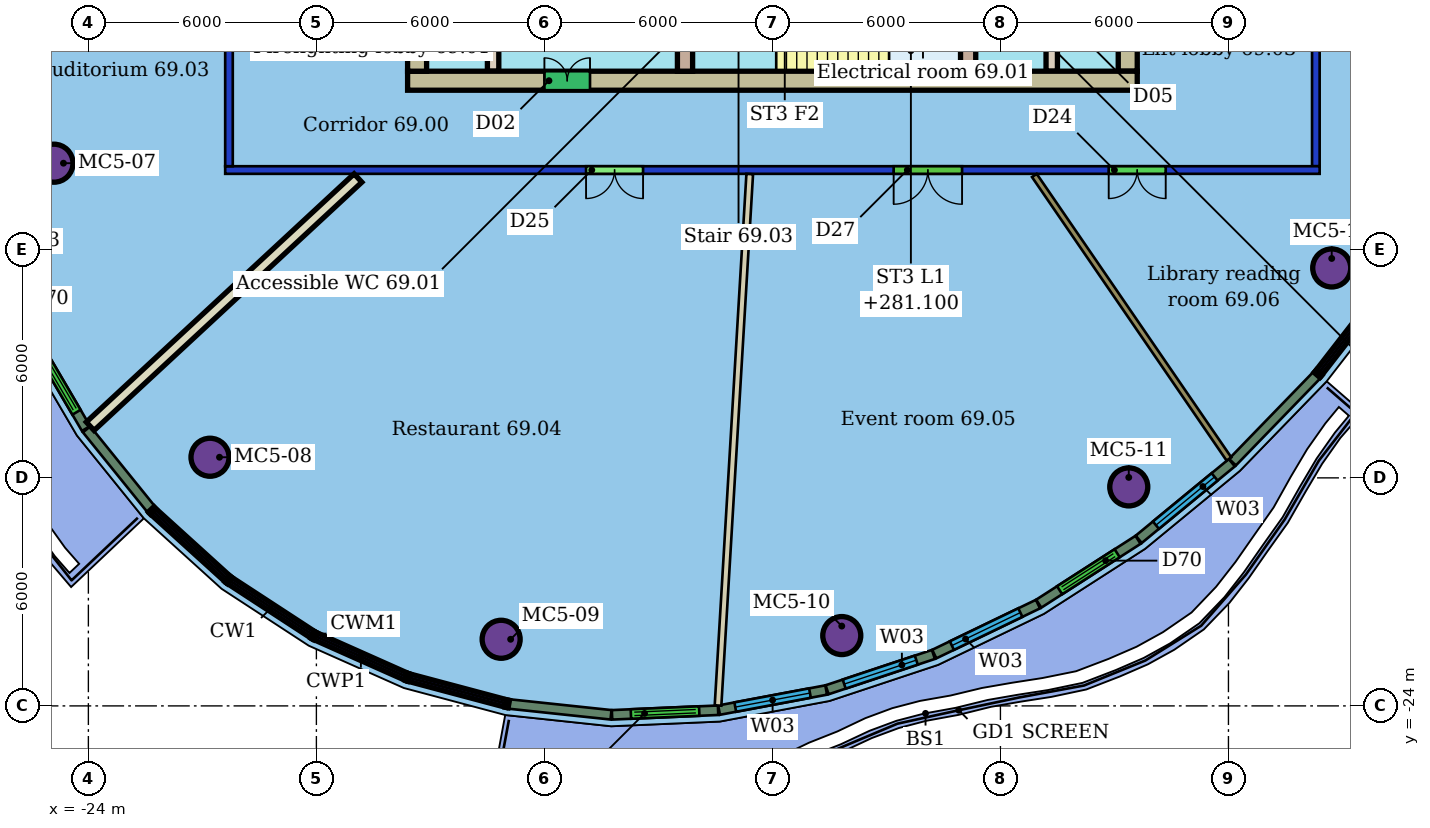
"""IFC4 building model, lengths in metres.
Left out: names, types, materials, properties, quantities, classifications, styles, units other than length and angle.
Written with IfcOpenShell. Run it as: python <this file> out.ifc"""

import sys

from ifc_helpers import new_model, si_unit, direction, frame, frame_2d, origin, origin_2d, place, context, subcontext, project, spatial, rectangle, hollow_circle, extrude, element, fill, save


model = new_model("IFC4")
c1 = context("Model", 3, precision=1e-05, world=origin(), true_north=direction((0.0, 1.0)))
c2 = subcontext(c1, "Body", "Model", "MODEL_VIEW")
j1 = project(units=[si_unit("LENGTHUNIT", "METRE"), si_unit("PLANEANGLEUNIT", "RADIAN")], contexts=[c1])
p1 = place(None, origin())
s1 = spatial("IfcSite", under=j1, at=p1, CompositionType="ELEMENT")
p2 = place(p1, origin())
s2 = spatial("IfcBuilding", under=s1, at=p2, CompositionType="ELEMENT")
p3 = place(p2, frame((0.0, 0.0, 279.3)))
s3 = spatial("IfcBuildingStorey", under=s2, at=p3, CompositionType="ELEMENT", Elevation=279.3)
for number, where, z_axis, x_axis in (
    (1, (-24.906, -9.72, 0.0), (0.0, 0.0, 1.0), (1.0, 0.0, 0.0)),
    (2, (-20.8, -17.457, 0.0), (0.0, 0.0, 1.0), (1.0, 0.0, 0.0)),
    (3, (-13.138, -22.247, 0.0), (0.0, 0.0, 1.0), (1.0, 0.0, 0.0)),
    (4, (-4.175, -22.149, 0.0), (0.0, 0.0, 1.0), (1.0, 0.0, 0.0)),
    (5, (3.377, -18.238, 0.0), (0.0, 0.0, 1.0), (1.0, 0.0, 0.0)),
    (6, (8.718, -12.477, 0.0), (0.0, 0.0, 1.0), (1.0, 0.0, 0.0)),
):
    element("IfcColumn", number, at=place(p3, frame(where, z_axis=z_axis, x_axis=x_axis)), inside=s3, PredefinedType="COLUMN", context=c2, shape_type="SweptSolid", body=[
        extrude(hollow_circle(Radius=0.5, WallThickness=0.04, at=origin_2d()), origin(), (0.0, 0.0, 1.0), 3.45),
    ])
p4 = place(p3, frame((8.4, -9.9, 0.0), z_axis=(0.0, 0.0, 1.0), x_axis=(-1.0, 0.0, 0.0)))
e7 = element("IfcWall", 7, at=p4, inside=s3, PredefinedType="PARTITIONING", context=c2, shape_type="SweptSolid", body=[
    extrude(rectangle(XDim=28.8, YDim=0.2, at=frame_2d((14.4, 0.0))), origin(), (0.0, 0.0, 1.0), 3.1),
])
p5 = place(p4, frame((17.804, 0.0, 0.0)))
e8 = element("IfcOpeningElement", 8, at=p5, cuts=e7, PredefinedType="OPENING", context=c2, shape_type="SweptSolid", body=[
    extrude(rectangle(XDim=1.5, YDim=2.4, at=frame_2d((0.75, 1.2))), frame((0.0, 0.11, 0.0), z_axis=(0.0, -1.0, 0.0), x_axis=(1.0, 0.0, 0.0)), (0.0, 0.0, 1.0), 0.22),
])
p6 = place(p4, frame((9.41, 0.0, 0.0)))
e9 = element("IfcOpeningElement", 9, at=p6, cuts=e7, PredefinedType="OPENING", context=c2, shape_type="SweptSolid", body=[
    extrude(rectangle(XDim=1.8, YDim=2.4, at=frame_2d((0.9, 1.2))), frame((0.0, 0.11, 0.0), z_axis=(0.0, -1.0, 0.0), x_axis=(1.0, 0.0, 0.0)), (0.0, 0.0, 1.0), 0.22),
])
p7 = place(p4, frame((4.051, 0.0, 0.0)))
e10 = element("IfcOpeningElement", 10, at=p7, cuts=e7, PredefinedType="OPENING", context=c2, shape_type="SweptSolid", body=[
    extrude(rectangle(XDim=1.5, YDim=2.1, at=frame_2d((0.75, 1.05))), frame((0.0, 0.11, 0.0), z_axis=(0.0, -1.0, 0.0), x_axis=(1.0, 0.0, 0.0)), (0.0, 0.0, 1.0), 0.22),
])
p8 = place(p3, frame((-20.3, -9.8, 0.0), z_axis=(0.0, 0.0, 1.0), x_axis=(0.0, 1.0, 0.0)))
e11 = element("IfcWall", 11, at=p8, inside=s3, PredefinedType="PARTITIONING", context=c2, shape_type="SweptSolid", body=[
    extrude(rectangle(XDim=19.6, YDim=0.2, at=frame_2d((9.8, 0.0))), origin(), (0.0, 0.0, 1.0), 3.1),
])
p9 = place(p8, frame((5.619, 0.0, 0.0)))
e12 = element("IfcOpeningElement", 12, at=p9, cuts=e11, PredefinedType="OPENING", context=c2, shape_type="SweptSolid", body=[
    extrude(rectangle(XDim=1.8, YDim=2.4, at=frame_2d((0.9, 1.2))), frame((0.0, 0.11, 0.0), z_axis=(0.0, -1.0, 0.0), x_axis=(1.0, 0.0, 0.0)), (0.0, 0.0, 1.0), 0.22),
])
p10 = place(p3, frame((8.3, 9.8, 0.0), z_axis=(0.0, 0.0, 1.0), x_axis=(0.0, -1.0, 0.0)))
e13 = element("IfcWall", 13, at=p10, inside=s3, PredefinedType="PARTITIONING", context=c2, shape_type="SweptSolid", body=[
    extrude(rectangle(XDim=19.6, YDim=0.2, at=frame_2d((9.8, 0.0))), origin(), (0.0, 0.0, 1.0), 3.1),
])
p11 = place(p10, frame((7.656, 0.0, 0.0)))
e14 = element("IfcOpeningElement", 14, at=p11, cuts=e13, PredefinedType="OPENING", context=c2, shape_type="SweptSolid", body=[
    extrude(rectangle(XDim=1.5, YDim=2.4, at=frame_2d((0.75, 1.2))), frame((0.0, 0.11, 0.0), z_axis=(0.0, -1.0, 0.0), x_axis=(1.0, 0.0, 0.0)), (0.0, 0.0, 1.0), 0.22),
])
p12 = place(p3, frame((-23.952, -16.642, 0.0), z_axis=(0.0, 0.0, 1.0), x_axis=(0.733357987337, 0.679842674748, 0.0)))
e15 = element("IfcWall", 15, at=p12, inside=s3, PredefinedType="PARTITIONING", context=c2, shape_type="SweptSolid", body=[
    extrude(rectangle(XDim=9.608, YDim=0.3, at=frame_2d((4.804, 0.0))), origin(), (0.0, 0.0, 1.0), 3.45),
])
p13 = place(p3, frame((-7.431, -23.99, 0.0), z_axis=(0.0, 0.0, 1.0), x_axis=(0.059548467955, 0.998225415407, 0.0)))
e16 = element("IfcWall", 16, at=p13, inside=s3, PredefinedType="PARTITIONING", context=c2, shape_type="SweptSolid", body=[
    extrude(rectangle(XDim=14.009, YDim=0.175, at=frame_2d((7.005, 0.0))), origin(), (0.0, 0.0, 1.0), 3.45),
])
p14 = place(p3, frame((6.013, -17.503, 0.0), z_axis=(0.0, 0.0, 1.0), x_axis=(-0.565875944345, 0.824490397525, 0.0)))
e17 = element("IfcWall", 17, at=p14, inside=s3, PredefinedType="PARTITIONING", context=c2, shape_type="SweptSolid", body=[
    extrude(rectangle(XDim=9.049, YDim=0.15, at=frame_2d((4.524, 0.0))), origin(), (0.0, 0.0, 1.0), 3.45),
])
p15 = place(p3, frame((-25.475, -14.292, 0.0), z_axis=(0.0, 0.0, 1.0), x_axis=(0.505988605638, -0.862540161943, 0.0)))
e18 = element("IfcWall", 18, at=p15, inside=s3, PredefinedType="SOLIDWALL", context=c2, shape_type="SweptSolid", body=[
    extrude(rectangle(XDim=2.794, YDim=0.25, at=frame_2d((1.397, 0.0))), origin(), (0.0, 0.0, 1.0), 3.15),
])
p16 = place(p15, frame((0.497, 0.0, 0.0)))
e19 = element("IfcOpeningElement", 19, at=p16, cuts=e18, PredefinedType="OPENING", context=c2, shape_type="SweptSolid", body=[
    extrude(rectangle(XDim=1.8, YDim=2.4, at=frame_2d((0.9, 1.2))), frame((0.0, 0.135, 0.0), z_axis=(0.0, -1.0, 0.0), x_axis=(1.0, 0.0, 0.0)), (0.0, 0.0, 1.0), 0.27),
])
for number, where, z_axis, x_axis in (
    (20, (-24.046, -16.723, 0.0), (0.0, 0.0, 1.0), (0.628, -0.778, 0.0)),
    (21, (-12.922, -23.95, 0.0), (0.0, 0.0, 1.0), (0.994, -0.106, 0.0)),
):
    element("IfcWall", number, at=place(p3, frame(where, z_axis=z_axis, x_axis=x_axis)), inside=s3, PredefinedType="SOLIDWALL", context=c2, shape_type="SweptSolid", body=[
        extrude(rectangle(XDim=2.69, YDim=0.25, at=frame_2d((1.345, 0.0))), origin(), (0.0, 0.0, 1.0), 3.15),
    ])
p17 = place(p3, frame((-10.221, -24.235, 0.0), z_axis=(0.0, 0.0, 1.0), x_axis=(0.999063892299, 0.043258977142, 0.0)))
e22 = element("IfcWall", 22, at=p17, inside=s3, PredefinedType="SOLIDWALL", context=c2, shape_type="SweptSolid", body=[
    extrude(rectangle(XDim=2.794, YDim=0.25, at=frame_2d((1.397, 0.0))), origin(), (0.0, 0.0, 1.0), 3.15),
])
p18 = place(p17, frame((0.497, 0.0, 0.0)))
e23 = element("IfcOpeningElement", 23, at=p18, cuts=e22, PredefinedType="OPENING", context=c2, shape_type="SweptSolid", body=[
    extrude(rectangle(XDim=1.8, YDim=2.4, at=frame_2d((0.9, 1.2))), frame((0.0, 0.135, 0.0), z_axis=(0.0, -1.0, 0.0), x_axis=(1.0, 0.0, 0.0)), (0.0, 0.0, 1.0), 0.27),
])
p19 = place(p3, frame((-7.404, -24.111, 0.0), z_axis=(0.0, 0.0, 1.0), x_axis=(0.982821071431, 0.184560942647, 0.0)))
e24 = element("IfcWall", 24, at=p19, inside=s3, PredefinedType="SOLIDWALL", context=c2, shape_type="SweptSolid", body=[
    extrude(rectangle(XDim=2.868, YDim=0.25, at=frame_2d((1.434, 0.0))), origin(), (0.0, 0.0, 1.0), 3.15),
])
p20 = place(p19, frame((0.434, 0.0, 0.9)))
e25 = element("IfcOpeningElement", 25, at=p20, cuts=e24, PredefinedType="OPENING", context=c2, shape_type="SweptSolid", body=[
    extrude(rectangle(XDim=2.0, YDim=2.1, at=frame_2d((1.0, 1.05))), frame((0.0, 0.135, 0.0), z_axis=(0.0, -1.0, 0.0), x_axis=(1.0, 0.0, 0.0)), (0.0, 0.0, 1.0), 0.27),
])
p21 = place(p3, frame((-4.562, -23.576, 0.0), z_axis=(0.0, 0.0, 1.0), x_axis=(0.948964440236, 0.315383086368, 0.0)))
e26 = element("IfcWall", 26, at=p21, inside=s3, PredefinedType="SOLIDWALL", context=c2, shape_type="SweptSolid", body=[
    extrude(rectangle(XDim=2.948, YDim=0.25, at=frame_2d((1.474, 0.0))), origin(), (0.0, 0.0, 1.0), 3.15),
])
p22 = place(p21, frame((0.474, 0.0, 0.9)))
e27 = element("IfcOpeningElement", 27, at=p22, cuts=e26, PredefinedType="OPENING", context=c2, shape_type="SweptSolid", body=[
    extrude(rectangle(XDim=2.0, YDim=2.1, at=frame_2d((1.0, 1.05))), frame((0.0, 0.135, 0.0), z_axis=(0.0, -1.0, 0.0), x_axis=(1.0, 0.0, 0.0)), (0.0, 0.0, 1.0), 0.27),
])
p23 = place(p3, frame((-1.741, -22.637, 0.0), z_axis=(0.0, 0.0, 1.0), x_axis=(0.900781065891, 0.434273498308, 0.0)))
e28 = element("IfcWall", 28, at=p23, inside=s3, PredefinedType="SOLIDWALL", context=c2, shape_type="SweptSolid", body=[
    extrude(rectangle(XDim=3.03, YDim=0.25, at=frame_2d((1.515, 0.0))), origin(), (0.0, 0.0, 1.0), 3.15),
])
p24 = place(p23, frame((0.515, 0.0, 0.9)))
e29 = element("IfcOpeningElement", 29, at=p24, cuts=e28, PredefinedType="OPENING", context=c2, shape_type="SweptSolid", body=[
    extrude(rectangle(XDim=2.0, YDim=2.1, at=frame_2d((1.0, 1.05))), frame((0.0, 0.135, 0.0), z_axis=(0.0, -1.0, 0.0), x_axis=(1.0, 0.0, 0.0)), (0.0, 0.0, 1.0), 0.27),
])
p25 = place(p3, frame((1.008, -21.31, 0.0), z_axis=(0.0, 0.0, 1.0), x_axis=(0.841150380815, 0.540801291469, 0.0)))
e30 = element("IfcWall", 30, at=p25, inside=s3, PredefinedType="SOLIDWALL", context=c2, shape_type="SweptSolid", body=[
    extrude(rectangle(XDim=3.106, YDim=0.25, at=frame_2d((1.553, 0.0))), origin(), (0.0, 0.0, 1.0), 3.15),
])
p26 = place(p25, frame((0.653, 0.0, 0.0)))
e31 = element("IfcOpeningElement", 31, at=p26, cuts=e30, PredefinedType="OPENING", context=c2, shape_type="SweptSolid", body=[
    extrude(rectangle(XDim=1.8, YDim=2.4, at=frame_2d((0.9, 1.2))), frame((0.0, 0.135, 0.0), z_axis=(0.0, -1.0, 0.0), x_axis=(1.0, 0.0, 0.0)), (0.0, 0.0, 1.0), 0.27),
])
p27 = place(p3, frame((3.639, -19.617, 0.0), z_axis=(0.0, 0.0, 1.0), x_axis=(0.772343261753, 0.635205388851, 0.0)))
e32 = element("IfcWall", 32, at=p27, inside=s3, PredefinedType="SOLIDWALL", context=c2, shape_type="SweptSolid", body=[
    extrude(rectangle(XDim=3.172, YDim=0.25, at=frame_2d((1.586, 0.0))), origin(), (0.0, 0.0, 1.0), 3.15),
])
p28 = place(p27, frame((0.586, 0.0, 0.9)))
e33 = element("IfcOpeningElement", 33, at=p28, cuts=e32, PredefinedType="OPENING", context=c2, shape_type="SweptSolid", body=[
    extrude(rectangle(XDim=2.0, YDim=2.1, at=frame_2d((1.0, 1.05))), frame((0.0, 0.135, 0.0), z_axis=(0.0, -1.0, 0.0), x_axis=(1.0, 0.0, 0.0)), (0.0, 0.0, 1.0), 0.27),
])
p29 = place(p3, frame((6.105, -17.587, 0.0), z_axis=(0.0, 0.0, 1.0), x_axis=(0.695972067976, 0.718068855053, 0.0)))
e34 = element("IfcWall", 34, at=p29, inside=s3, PredefinedType="SOLIDWALL", context=c2, shape_type="SweptSolid", body=[
    extrude(rectangle(XDim=3.182, YDim=0.25, at=frame_2d((1.591, 0.0))), origin(), (0.0, 0.0, 1.0), 3.15),
])
p30 = place(p3, frame((-15.6, -7.55, 0.0), z_axis=(0.0, 0.0, 1.0), x_axis=(1.0, 0.0, 0.0)))
e35 = element("IfcWall", 35, at=p30, inside=s3, PredefinedType="SHEAR", context=c2, shape_type="SweptSolid", body=[
    extrude(rectangle(XDim=19.2, YDim=0.5, at=frame_2d((9.6, 0.0))), origin(), (0.0, 0.0, 1.0), 3.3),
])
p31 = place(p30, frame((3.6, 0.0, 0.0)))
e36 = element("IfcOpeningElement", 36, at=p31, cuts=e35, PredefinedType="OPENING", context=c2, shape_type="SweptSolid", body=[
    extrude(rectangle(XDim=1.2, YDim=2.1, at=frame_2d((0.6, 1.05))), frame((0.0, 0.26, 0.0), z_axis=(0.0, -1.0, 0.0), x_axis=(1.0, 0.0, 0.0)), (0.0, 0.0, 1.0), 0.52),
])
p32 = place(p3, frame((-15.35, 7.3, 0.0), z_axis=(0.0, 0.0, 1.0), x_axis=(0.0, -1.0, 0.0)))
e37 = element("IfcWall", 37, at=p32, inside=s3, PredefinedType="SHEAR", context=c2, shape_type="SweptSolid", body=[
    extrude(rectangle(XDim=14.6, YDim=0.5, at=frame_2d((7.3, 0.0))), origin(), (0.0, 0.0, 1.0), 3.3),
])
p33 = place(p32, frame((10.6, 0.0, 0.0)))
e38 = element("IfcOpeningElement", 38, at=p33, cuts=e37, PredefinedType="OPENING", context=c2, shape_type="SweptSolid", body=[
    extrude(rectangle(XDim=1.2, YDim=2.1, at=frame_2d((0.6, 1.05))), frame((0.0, 0.26, 0.0), z_axis=(0.0, -1.0, 0.0), x_axis=(1.0, 0.0, 0.0)), (0.0, 0.0, 1.0), 0.52),
])
p34 = place(p32, frame((2.8, 0.0, 0.0)))
e39 = element("IfcOpeningElement", 39, at=p34, cuts=e37, PredefinedType="OPENING", context=c2, shape_type="SweptSolid", body=[
    extrude(rectangle(XDim=1.2, YDim=2.1, at=frame_2d((0.6, 1.05))), frame((0.0, 0.26, 0.0), z_axis=(0.0, -1.0, 0.0), x_axis=(1.0, 0.0, 0.0)), (0.0, 0.0, 1.0), 0.52),
])
p35 = place(p3, frame((3.35, -7.3, 0.0), z_axis=(0.0, 0.0, 1.0), x_axis=(0.0, 1.0, 0.0)))
e40 = element("IfcWall", 40, at=p35, inside=s3, PredefinedType="SHEAR", context=c2, shape_type="SweptSolid", body=[
    extrude(rectangle(XDim=14.6, YDim=0.5, at=frame_2d((7.3, 0.0))), origin(), (0.0, 0.0, 1.0), 3.3),
])
p36 = place(p35, frame((2.8, 0.0, 0.0)))
e41 = element("IfcOpeningElement", 41, at=p36, cuts=e40, PredefinedType="OPENING", context=c2, shape_type="SweptSolid", body=[
    extrude(rectangle(XDim=1.2, YDim=2.1, at=frame_2d((0.6, 1.05))), frame((0.0, 0.26, 0.0), z_axis=(0.0, -1.0, 0.0), x_axis=(1.0, 0.0, 0.0)), (0.0, 0.0, 1.0), 0.52),
])
p37 = place(p35, frame((10.6, 0.0, 0.0)))
e42 = element("IfcOpeningElement", 42, at=p37, cuts=e40, PredefinedType="OPENING", context=c2, shape_type="SweptSolid", body=[
    extrude(rectangle(XDim=1.2, YDim=2.1, at=frame_2d((0.6, 1.05))), frame((0.0, 0.26, 0.0), z_axis=(0.0, -1.0, 0.0), x_axis=(1.0, 0.0, 0.0)), (0.0, 0.0, 1.0), 0.52),
])
p38 = place(p3, frame((-13.35, 7.3, 0.0), z_axis=(0.0, 0.0, 1.0), x_axis=(0.0, -1.0, 0.0)))
e43 = element("IfcWall", 43, at=p38, inside=s3, PredefinedType="SHEAR", context=c2, shape_type="SweptSolid", body=[
    extrude(rectangle(XDim=14.6, YDim=0.3, at=frame_2d((7.3, 0.0))), origin(), (0.0, 0.0, 1.0), 3.3),
])
p39 = place(p38, frame((6.55, 0.0, 0.0)))
e44 = element("IfcOpeningElement", 44, at=p39, cuts=e43, PredefinedType="OPENING", context=c2, shape_type="SweptSolid", body=[
    extrude(rectangle(XDim=1.5, YDim=2.1, at=frame_2d((0.75, 1.05))), frame((0.0, 0.16, 0.0), z_axis=(0.0, -1.0, 0.0), x_axis=(1.0, 0.0, 0.0)), (0.0, 0.0, 1.0), 0.32),
])
p40 = place(p3, frame((1.35, -7.3, 0.0), z_axis=(0.0, 0.0, 1.0), x_axis=(0.0, 1.0, 0.0)))
e45 = element("IfcWall", 45, at=p40, inside=s3, PredefinedType="SHEAR", context=c2, shape_type="SweptSolid", body=[
    extrude(rectangle(XDim=14.6, YDim=0.3, at=frame_2d((7.3, 0.0))), origin(), (0.0, 0.0, 1.0), 3.3),
])
p41 = place(p40, frame((1.21, 0.0, 0.0)))
e46 = element("IfcOpeningElement", 46, at=p41, cuts=e45, PredefinedType="OPENING", context=c2, shape_type="SweptSolid", body=[
    extrude(rectangle(XDim=1.0, YDim=2.1, at=frame_2d((0.5, 1.05))), frame((0.0, 0.16, 0.0), z_axis=(0.0, -1.0, 0.0), x_axis=(1.0, 0.0, 0.0)), (0.0, 0.0, 1.0), 0.32),
])
p42 = place(p40, frame((6.55, 0.0, 0.0)))
e47 = element("IfcOpeningElement", 47, at=p42, cuts=e45, PredefinedType="OPENING", context=c2, shape_type="SweptSolid", body=[
    extrude(rectangle(XDim=1.5, YDim=2.1, at=frame_2d((0.75, 1.05))), frame((0.0, 0.16, 0.0), z_axis=(0.0, -1.0, 0.0), x_axis=(1.0, 0.0, 0.0)), (0.0, 0.0, 1.0), 0.32),
])
p43 = place(p3, frame((-8.3, -3.88, 0.0), z_axis=(0.0, 0.0, 1.0), x_axis=(0.0, -1.0, 0.0)))
e48 = element("IfcWall", 48, at=p43, inside=s3, PredefinedType="SHEAR", context=c2, shape_type="SweptSolid", body=[
    extrude(rectangle(XDim=3.42, YDim=0.4, at=frame_2d((1.71, 0.0))), origin(), (0.0, 0.0, 1.0), 3.3),
])
p44 = place(p43, frame((1.11, 0.0, 0.0)))
e49 = element("IfcOpeningElement", 49, at=p44, cuts=e48, PredefinedType="OPENING", context=c2, shape_type="SweptSolid", body=[
    extrude(rectangle(XDim=1.2, YDim=2.1, at=frame_2d((0.6, 1.05))), frame((0.0, 0.21, 0.0), z_axis=(0.0, -1.0, 0.0), x_axis=(1.0, 0.0, 0.0)), (0.0, 0.0, 1.0), 0.42),
])
p45 = place(p3, frame((-0.85, -3.88, 0.0), z_axis=(0.0, 0.0, 1.0), x_axis=(0.0, -1.0, 0.0)))
e50 = element("IfcWall", 50, at=p45, inside=s3, PredefinedType="SHEAR", context=c2, shape_type="SweptSolid", body=[
    extrude(rectangle(XDim=3.42, YDim=0.4, at=frame_2d((1.71, 0.0))), origin(), (0.0, 0.0, 1.0), 3.3),
])
p46 = place(p5, origin())
e51 = element("IfcDoor", 51, at=p46, inside=s3, OperationType="DOUBLE_DOOR_SINGLE_SWING", PredefinedType="DOOR", context=c2, shape_type="SweptSolid", body=[
    extrude(rectangle(XDim=1.5, YDim=2.4, at=frame_2d((0.75, 1.2))), frame((0.0, 0.025, 0.0), z_axis=(0.0, -1.0, 0.0), x_axis=(1.0, 0.0, 0.0)), (0.0, 0.0, 1.0), 0.05),
])
fill(e8, e51)
p47 = place(p6, origin())
e52 = element("IfcDoor", 52, at=p47, inside=s3, OperationType="DOUBLE_DOOR_SINGLE_SWING", PredefinedType="DOOR", context=c2, shape_type="SweptSolid", body=[
    extrude(rectangle(XDim=1.8, YDim=2.4, at=frame_2d((0.9, 1.2))), frame((0.0, 0.025, 0.0), z_axis=(0.0, -1.0, 0.0), x_axis=(1.0, 0.0, 0.0)), (0.0, 0.0, 1.0), 0.05),
])
fill(e9, e52)
p48 = place(p7, origin())
e53 = element("IfcDoor", 53, at=p48, inside=s3, OperationType="DOUBLE_DOOR_SINGLE_SWING", PredefinedType="DOOR", context=c2, shape_type="SweptSolid", body=[
    extrude(rectangle(XDim=1.5, YDim=2.1, at=frame_2d((0.75, 1.05))), frame((0.0, 0.025, 0.0), z_axis=(0.0, -1.0, 0.0), x_axis=(1.0, 0.0, 0.0)), (0.0, 0.0, 1.0), 0.05),
])
fill(e10, e53)
p49 = place(p16, origin())
e54 = element("IfcDoor", 54, at=p49, inside=s3, OperationType="DOUBLE_DOOR_SLIDING", PredefinedType="DOOR", context=c2, shape_type="SweptSolid", body=[
    extrude(rectangle(XDim=1.8, YDim=2.4, at=frame_2d((0.9, 1.2))), frame((0.0, 0.025, 0.0), z_axis=(0.0, -1.0, 0.0), x_axis=(1.0, 0.0, 0.0)), (0.0, 0.0, 1.0), 0.05),
])
fill(e19, e54)
p50 = place(p18, origin())
e55 = element("IfcDoor", 55, at=p50, inside=s3, OperationType="DOUBLE_DOOR_SLIDING", PredefinedType="DOOR", context=c2, shape_type="SweptSolid", body=[
    extrude(rectangle(XDim=1.8, YDim=2.4, at=frame_2d((0.9, 1.2))), frame((0.0, 0.025, 0.0), z_axis=(0.0, -1.0, 0.0), x_axis=(1.0, 0.0, 0.0)), (0.0, 0.0, 1.0), 0.05),
])
fill(e23, e55)
p51 = place(p20, origin())
e56 = element("IfcWindow", 56, at=p51, inside=s3, PartitioningType="SINGLE_PANEL", PredefinedType="WINDOW", context=c2, shape_type="SweptSolid", body=[
    extrude(rectangle(XDim=2.0, YDim=2.1, at=frame_2d((1.0, 1.05))), frame((0.0, 0.03, 0.0), z_axis=(0.0, -1.0, 0.0), x_axis=(1.0, 0.0, 0.0)), (0.0, 0.0, 1.0), 0.06),
])
fill(e25, e56)
p52 = place(p22, origin())
e57 = element("IfcWindow", 57, at=p52, inside=s3, PartitioningType="SINGLE_PANEL", PredefinedType="WINDOW", context=c2, shape_type="SweptSolid", body=[
    extrude(rectangle(XDim=2.0, YDim=2.1, at=frame_2d((1.0, 1.05))), frame((0.0, 0.03, 0.0), z_axis=(0.0, -1.0, 0.0), x_axis=(1.0, 0.0, 0.0)), (0.0, 0.0, 1.0), 0.06),
])
fill(e27, e57)
p53 = place(p24, origin())
e58 = element("IfcWindow", 58, at=p53, inside=s3, PartitioningType="SINGLE_PANEL", PredefinedType="WINDOW", context=c2, shape_type="SweptSolid", body=[
    extrude(rectangle(XDim=2.0, YDim=2.1, at=frame_2d((1.0, 1.05))), frame((0.0, 0.03, 0.0), z_axis=(0.0, -1.0, 0.0), x_axis=(1.0, 0.0, 0.0)), (0.0, 0.0, 1.0), 0.06),
])
fill(e29, e58)
p54 = place(p26, origin())
e59 = element("IfcDoor", 59, at=p54, inside=s3, OperationType="DOUBLE_DOOR_SLIDING", PredefinedType="DOOR", context=c2, shape_type="SweptSolid", body=[
    extrude(rectangle(XDim=1.8, YDim=2.4, at=frame_2d((0.9, 1.2))), frame((0.0, 0.025, 0.0), z_axis=(0.0, -1.0, 0.0), x_axis=(1.0, 0.0, 0.0)), (0.0, 0.0, 1.0), 0.05),
])
fill(e31, e59)
p55 = place(p28, origin())
e60 = element("IfcWindow", 60, at=p55, inside=s3, PartitioningType="SINGLE_PANEL", PredefinedType="WINDOW", context=c2, shape_type="SweptSolid", body=[
    extrude(rectangle(XDim=2.0, YDim=2.1, at=frame_2d((1.0, 1.05))), frame((0.0, 0.03, 0.0), z_axis=(0.0, -1.0, 0.0), x_axis=(1.0, 0.0, 0.0)), (0.0, 0.0, 1.0), 0.06),
])
fill(e33, e60)
p56 = place(p31, origin())
e61 = element("IfcDoor", 61, at=p56, inside=s3, OperationType="DOUBLE_DOOR_SINGLE_SWING", PredefinedType="NOTDEFINED", context=c2, shape_type="SweptSolid", body=[
    extrude(rectangle(XDim=1.2, YDim=2.1, at=frame_2d((0.6, 1.05))), frame((0.0, 0.025, 0.0), z_axis=(0.0, -1.0, 0.0), x_axis=(1.0, 0.0, 0.0)), (0.0, 0.0, 1.0), 0.05),
])
fill(e36, e61)
save(model, sys.argv[1])
